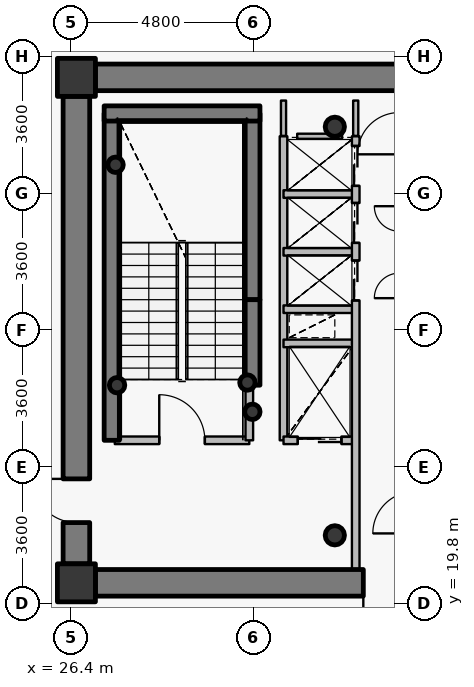
"""IFC4 building model, lengths in metres.
Left out: names, types, materials, properties, quantities, classifications, styles, units other than length and angle.
Written with IfcOpenShell. Run it as: python <this file> out.ifc"""

import sys

from ifc_helpers import new_model, si_unit, direction, frame, frame_2d, origin, origin_2d, place, context, subcontext, project, spatial, rectangle, hollow_circle, extrude, source, transform, mapped, element, fill, save


model = new_model("IFC4")
c1 = context("Model", 3, precision=1e-05, world=origin(), true_north=direction((0.0, 1.0)))
c2 = subcontext(c1, "Body", "Model", "MODEL_VIEW")
j1 = project(units=[si_unit("LENGTHUNIT", "METRE"), si_unit("PLANEANGLEUNIT", "RADIAN")], contexts=[c1])
p1 = place(None, origin())
s1 = spatial("IfcSite", under=j1, at=p1, CompositionType="ELEMENT")
p2 = place(p1, origin())
s2 = spatial("IfcBuilding", under=s1, at=p2, CompositionType="ELEMENT")
p3 = place(p2, frame((0.0, 0.0, 229.05)))
s3 = spatial("IfcBuildingStorey", under=s2, at=p3, CompositionType="ELEMENT", Elevation=229.05)
for number, where, z_axis, x_axis in (
    (1, (26.55, 20.35, 0.0), (0.0, 0.0, 1.0), (1.0, 0.0, 0.0)),
    (2, (26.55, 33.65, 0.0), (0.0, 0.0, 1.0), (1.0, 0.0, 0.0)),
):
    element("IfcColumn", number, at=place(p3, frame(where, z_axis=z_axis, x_axis=x_axis)), inside=s3, PredefinedType="COLUMN", context=c2, shape_type="SweptSolid", body=[
        extrude(rectangle(XDim=1.0, YDim=1.0, at=origin_2d()), origin(), (0.0, 0.0, 1.0), 3.75),
    ])
for number, where, z_axis, x_axis in (
    (3, (33.35, 21.6, 0.0), (0.0, 0.0, 1.0), (1.0, 0.0, 0.0)),
    (4, (33.35, 32.35, 0.0), (0.0, 0.0, 1.0), (1.0, 0.0, 0.0)),
):
    element("IfcColumn", number, at=place(p3, frame(where, z_axis=z_axis, x_axis=x_axis)), inside=s3, PredefinedType="COLUMN", context=c2, shape_type="SweptSolid", body=[
        extrude(hollow_circle(Radius=0.254, WallThickness=0.02, at=origin_2d()), origin(), (0.0, 0.0, 1.0), 3.75),
    ])
p4 = place(p3, frame((27.48, 24.1, 0.0), z_axis=(0.0, 0.0, 1.0), x_axis=(0.0, 1.0, 0.0)))
e5 = element("IfcWall", 5, at=p4, inside=s3, PredefinedType="SHEAR", context=c2, shape_type="SweptSolid", body=[
    extrude(rectangle(XDim=8.6, YDim=0.4, at=frame_2d((4.3, 0.0))), origin(), (0.0, 0.0, 1.0), 3.75),
])
p5 = place(p3, frame((31.18, 27.8, 0.0), z_axis=(0.0, 0.0, 1.0), x_axis=(0.0, 1.0, 0.0)))
e6 = element("IfcWall", 6, at=p5, inside=s3, PredefinedType="SHEAR", context=c2, shape_type="SweptSolid", body=[
    extrude(rectangle(XDim=4.9, YDim=0.4, at=frame_2d((2.45, 0.0))), origin(), (0.0, 0.0, 1.0), 3.75),
])
p6 = place(p3, frame((27.28, 32.7, 0.0), z_axis=(0.0, 0.0, 1.0), x_axis=(1.0, 0.0, 0.0)))
e7 = element("IfcWall", 7, at=p6, inside=s3, PredefinedType="SHEAR", context=c2, shape_type="SweptSolid", body=[
    extrude(rectangle(XDim=4.1, YDim=0.4, at=frame_2d((2.05, 0.0))), origin(), (0.0, 0.0, 1.0), 3.75),
])
for number, where, z_axis, x_axis in (
    (8, (27.58, 31.35, 0.0), (0.0, 0.0, 1.0), (1.0, 0.0, 0.0)),
    (9, (31.05, 25.62, 0.0), (0.0, 0.0, 1.0), (1.0, 0.0, 0.0)),
    (10, (31.18, 24.85, 0.0), (0.0, 0.0, 1.0), (1.0, 0.0, 0.0)),
    (11, (27.62, 25.55, 0.0), (0.0, 0.0, 1.0), (1.0, 0.0, 0.0)),
):
    element("IfcColumn", number, at=place(p3, frame(where, z_axis=z_axis, x_axis=x_axis)), inside=s3, PredefinedType="COLUMN", context=c2, shape_type="SweptSolid", body=[
        extrude(hollow_circle(Radius=0.203, WallThickness=0.016, at=origin_2d()), origin(), (0.0, 0.0, 1.0), 3.75),
    ])
p7 = place(p3, frame((27.05, 33.65, 0.0), z_axis=(0.0, 0.0, 1.0), x_axis=(1.0, 0.0, 0.0)))
e12 = element("IfcWall", 12, at=p7, inside=s3, PredefinedType="SHEAR", context=c2, shape_type="SweptSolid", body=[
    extrude(rectangle(XDim=17.9, YDim=0.7, at=frame_2d((8.95, 0.0))), origin(), (0.0, 0.0, 1.0), 3.05),
])
p8 = place(p7, frame((13.675, 0.0, 0.0)))
e13 = element("IfcOpeningElement", 13, at=p8, cuts=e12, PredefinedType="OPENING", context=c2, shape_type="SweptSolid", body=[
    extrude(rectangle(XDim=1.15, YDim=2.15, at=origin_2d()), frame((0.575, 0.36, 1.075), z_axis=(0.0, -1.0, 0.0), x_axis=(1.0, 0.0, 0.0)), (0.0, 0.0, 1.0), 0.72),
])
p9 = place(p3, frame((44.95, 20.35, 0.0), z_axis=(0.0, 0.0, 1.0), x_axis=(-1.0, 0.0, 0.0)))
e14 = element("IfcWall", 14, at=p9, inside=s3, PredefinedType="SHEAR", context=c2, shape_type="SweptSolid", body=[
    extrude(rectangle(XDim=17.9, YDim=0.7, at=frame_2d((8.95, 0.0))), origin(), (0.0, 0.0, 1.0), 3.05),
])
p10 = place(p9, frame((9.7, 0.0, 0.0)))
e15 = element("IfcOpeningElement", 15, at=p10, cuts=e14, PredefinedType="OPENING", context=c2, shape_type="SweptSolid", body=[
    extrude(rectangle(XDim=1.15, YDim=2.15, at=origin_2d()), frame((0.575, 0.36, 1.075), z_axis=(0.0, -1.0, 0.0), x_axis=(1.0, 0.0, 0.0)), (0.0, 0.0, 1.0), 0.72),
])
p11 = place(p3, frame((26.55, 20.85, 0.0), z_axis=(0.0, 0.0, 1.0), x_axis=(0.0, 1.0, 0.0)))
e16 = element("IfcWall", 16, at=p11, inside=s3, PredefinedType="SHEAR", context=c2, shape_type="SweptSolid", body=[
    extrude(rectangle(XDim=12.3, YDim=0.7, at=frame_2d((6.15, 0.0))), origin(), (0.0, 0.0, 1.0), 3.05),
])
p12 = place(p11, frame((1.085, 0.0, 0.0)))
e17 = element("IfcOpeningElement", 17, at=p12, cuts=e16, PredefinedType="OPENING", context=c2, shape_type="SweptSolid", body=[
    extrude(rectangle(XDim=1.15, YDim=2.15, at=origin_2d()), frame((0.575, 0.36, 1.075), z_axis=(0.0, -1.0, 0.0), x_axis=(1.0, 0.0, 0.0)), (0.0, 0.0, 1.0), 0.72),
])
p13 = place(p3, frame((31.18, 25.55, 0.0), z_axis=(0.0, 0.0, 1.0), x_axis=(0.0, 1.0, 0.0)))
e18 = element("IfcWall", 18, at=p13, inside=s3, PredefinedType="SHEAR", context=c2, shape_type="SweptSolid", body=[
    extrude(rectangle(XDim=2.25, YDim=0.4, at=frame_2d((1.125, 0.0))), origin(), (0.0, 0.0, 1.0), 3.1),
])
p14 = place(p3, frame((27.56, 24.1, 0.0), z_axis=(0.0, 0.0, 1.0), x_axis=(1.0, 0.0, 0.0)))
e19 = element("IfcWall", 19, at=p14, inside=s3, PredefinedType="PARTITIONING", context=c2, shape_type="SweptSolid", body=[
    extrude(rectangle(XDim=3.54, YDim=0.2, at=frame_2d((1.77, 0.0))), origin(), (0.0, 0.0, 1.0), 3.5),
])
p15 = place(p14, frame((1.17, 0.0, 0.0)))
e20 = element("IfcOpeningElement", 20, at=p15, cuts=e19, PredefinedType="OPENING", context=c2, shape_type="SweptSolid", body=[
    extrude(rectangle(XDim=1.2, YDim=2.15, at=origin_2d()), frame((0.6, 0.11, 1.075), z_axis=(0.0, -1.0, 0.0), x_axis=(1.0, 0.0, 0.0)), (0.0, 0.0, 1.0), 0.22),
])
p16 = place(p3, frame((31.1, 24.1, 0.0), z_axis=(0.0, 0.0, 1.0), x_axis=(0.0, 1.0, 0.0)))
e21 = element("IfcWall", 21, at=p16, inside=s3, PredefinedType="PARTITIONING", context=c2, shape_type="SweptSolid", body=[
    extrude(rectangle(XDim=1.44, YDim=0.2, at=frame_2d((0.72, 0.0))), origin(), (0.0, 0.0, 1.0), 3.5),
])
p17 = place(p3, frame((32.0, 24.1, 0.0), z_axis=(0.0, 0.0, 1.0), x_axis=(0.0, 1.0, 0.0)))
e22 = element("IfcWall", 22, at=p17, inside=s3, PredefinedType="PARTITIONING", context=c2, shape_type="SweptSolid", body=[
    extrude(rectangle(XDim=8.0, YDim=0.2, at=frame_2d((4.0, 0.0))), origin(), (0.0, 0.0, 1.0), 3.5),
])
p18 = place(p3, frame((32.0, 24.1, 0.0), z_axis=(0.0, 0.0, 1.0), x_axis=(1.0, 0.0, 0.0)))
e23 = element("IfcWall", 23, at=p18, inside=s3, PredefinedType="PARTITIONING", context=c2, shape_type="SweptSolid", body=[
    extrude(rectangle(XDim=1.9, YDim=0.2, at=frame_2d((0.95, 0.0))), origin(), (0.0, 0.0, 1.0), 3.085),
])
p19 = place(p18, frame((0.375, 0.0, 0.0)))
e24 = element("IfcOpeningElement", 24, at=p19, cuts=e23, PredefinedType="OPENING", context=c2, shape_type="SweptSolid", body=[
    extrude(rectangle(XDim=1.15, YDim=2.15, at=origin_2d()), frame((0.575, 0.11, 1.075), z_axis=(0.0, -1.0, 0.0), x_axis=(1.0, 0.0, 0.0)), (0.0, 0.0, 1.0), 0.22),
])
for number, where, z_axis, x_axis in (
    (25, (32.0, 26.65, 0.0), (0.0, 0.0, 1.0), (1.0, 0.0, 0.0)),
    (26, (32.0, 27.55, 0.0), (0.0, 0.0, 1.0), (1.0, 0.0, 0.0)),
    (27, (32.0, 29.06, 0.0), (0.0, 0.0, 1.0), (1.0, 0.0, 0.0)),
    (28, (32.0, 30.58, 0.0), (0.0, 0.0, 1.0), (1.0, 0.0, 0.0)),
):
    element("IfcWall", number, at=place(p3, frame(where, z_axis=z_axis, x_axis=x_axis)), inside=s3, PredefinedType="PARTITIONING", context=c2, shape_type="SweptSolid", body=[
        extrude(rectangle(XDim=1.9, YDim=0.2, at=frame_2d((0.95, 0.0))), origin(), (0.0, 0.0, 1.0), 3.085),
    ])
p20 = place(p3, frame((33.9, 20.7, 0.0), z_axis=(0.0, 0.0, 1.0), x_axis=(0.0, 1.0, 0.0)))
e29 = element("IfcWall", 29, at=p20, inside=s3, PredefinedType="PARTITIONING", context=c2, shape_type="SweptSolid", body=[
    extrude(rectangle(XDim=11.4, YDim=0.2, at=frame_2d((5.7, 0.0))), origin(), (0.0, 0.0, 1.0), 3.085),
])
p21 = place(p20, frame((7.08, 0.0, 0.0)))
e30 = element("IfcOpeningElement", 30, at=p21, cuts=e29, PredefinedType="OPENING", context=c2, shape_type="SweptSolid", body=[
    extrude(rectangle(XDim=1.05, YDim=2.15, at=origin_2d()), frame((0.525, 0.11, 1.075), z_axis=(0.0, -1.0, 0.0), x_axis=(1.0, 0.0, 0.0)), (0.0, 0.0, 1.0), 0.22),
])
p22 = place(p20, frame((8.595, 0.0, 0.0)))
e31 = element("IfcOpeningElement", 31, at=p22, cuts=e29, PredefinedType="OPENING", context=c2, shape_type="SweptSolid", body=[
    extrude(rectangle(XDim=1.05, YDim=2.15, at=origin_2d()), frame((0.525, 0.11, 1.075), z_axis=(0.0, -1.0, 0.0), x_axis=(1.0, 0.0, 0.0)), (0.0, 0.0, 1.0), 0.22),
])
p23 = place(p20, frame((10.095, 0.0, 0.0)))
e32 = element("IfcOpeningElement", 32, at=p23, cuts=e29, PredefinedType="OPENING", context=c2, shape_type="SweptSolid", body=[
    extrude(rectangle(XDim=1.05, YDim=2.15, at=origin_2d()), frame((0.525, 0.11, 1.075), z_axis=(0.0, -1.0, 0.0), x_axis=(1.0, 0.0, 0.0)), (0.0, 0.0, 1.0), 0.22),
])
p24 = place(p3, frame((32.36, 32.1, 0.0), z_axis=(0.0, 0.0, 1.0), x_axis=(1.0, 0.0, 0.0)))
e33 = element("IfcWall", 33, at=p24, inside=s3, PredefinedType="PARTITIONING", context=c2, shape_type="SweptSolid", body=[
    extrude(rectangle(XDim=1.18, YDim=0.135, at=frame_2d((0.59, 0.0))), origin(), (0.0, 0.0, 1.0), 3.085),
])
p25 = place(p3, frame((32.0, 33.04, 0.0), z_axis=(0.0, 0.0, 1.0), x_axis=(0.0, -1.0, 0.0)))
e34 = element("IfcWall", 34, at=p25, inside=s3, PredefinedType="PARTITIONING", context=c2, shape_type="SweptSolid", body=[
    extrude(rectangle(XDim=0.93, YDim=0.135, at=frame_2d((0.465, 0.0))), origin(), (0.0, 0.0, 1.0), 3.035),
])
p26 = place(p3, frame((33.9, 32.11, 0.0), z_axis=(0.0, 0.0, 1.0), x_axis=(0.0, 1.0, 0.0)))
e35 = element("IfcWall", 35, at=p26, inside=s3, PredefinedType="PARTITIONING", context=c2, shape_type="SweptSolid", body=[
    extrude(rectangle(XDim=0.93, YDim=0.135, at=frame_2d((0.465, 0.0))), origin(), (0.0, 0.0, 1.0), 3.085),
])
p27 = place(p3, frame((27.04, 34.0, 0.0), z_axis=(0.0, 0.0, 1.0), x_axis=(-1.0, 0.0, 0.0)))
e36 = element("IfcWall", 36, at=p27, inside=s3, PredefinedType="PARTITIONING", context=c2, shape_type="SweptSolid", body=[
    extrude(rectangle(XDim=0.84, YDim=0.135, at=frame_2d((0.42, 0.0))), origin(), (0.0, 0.0, 1.0), 2.935),
])
p28 = place(p3, frame((26.2, 33.692, 0.0), z_axis=(0.0, 0.0, 1.0), x_axis=(0.0, -1.0, 0.0)))
e37 = element("IfcWall", 37, at=p28, inside=s3, PredefinedType="PARTITIONING", context=c2, shape_type="SweptSolid", body=[
    extrude(rectangle(XDim=0.532, YDim=0.135, at=frame_2d((0.266, 0.0))), origin(), (0.0, 0.0, 1.0), 3.5),
])
p29 = place(p3, frame((26.2, 20.84, 0.0), z_axis=(0.0, 0.0, 1.0), x_axis=(0.0, -1.0, 0.0)))
e38 = element("IfcWall", 38, at=p29, inside=s3, PredefinedType="PARTITIONING", context=c2, shape_type="SweptSolid", body=[
    extrude(rectangle(XDim=0.84, YDim=0.135, at=frame_2d((0.42, 0.0))), origin(), (0.0, 0.0, 1.0), 3.185),
])
p30 = place(p3, frame((26.508, 20.0, 0.0), z_axis=(0.0, 0.0, 1.0), x_axis=(1.0, 0.0, 0.0)))
e39 = element("IfcWall", 39, at=p30, inside=s3, PredefinedType="PARTITIONING", context=c2, shape_type="SweptSolid", body=[
    extrude(rectangle(XDim=0.532, YDim=0.135, at=frame_2d((0.266, 0.0))), origin(), (0.0, 0.0, 1.0), 2.935),
])
m1 = source(origin(), c2, "Body", "SweptSolid", [
    extrude(rectangle(XDim=1.15, YDim=2.15, at=origin_2d()), frame((0.575, 0.025, 1.075), z_axis=(0.0, -1.0, 0.0), x_axis=(1.0, 0.0, 0.0)), (0.0, 0.0, 1.0), 0.05),
])
p31 = place(p12, origin())
e40 = element("IfcDoor", 40, at=p31, inside=s3, OperationType="SINGLE_SWING_RIGHT", PredefinedType="DOOR", context=c2, shape_type="MappedRepresentation", body=[
    mapped(m1, transform((0.0, 0.0, 0.0), x_axis=(1.0, 0.0, 0.0), y_axis=(0.0, 1.0, 0.0), z_axis=(0.0, 0.0, 1.0), scale=1.0)),
])
fill(e17, e40)
p32 = place(p10, origin())
e41 = element("IfcDoor", 41, at=p32, inside=s3, OperationType="SINGLE_SWING_RIGHT", PredefinedType="DOOR", context=c2, shape_type="MappedRepresentation", body=[
    mapped(m1, transform((0.0, 0.0, 0.0), x_axis=(1.0, 0.0, 0.0), y_axis=(0.0, 1.0, 0.0), z_axis=(0.0, 0.0, 1.0), scale=1.0)),
])
fill(e15, e41)
m2 = source(origin(), c2, "Body", "SweptSolid", [
    extrude(rectangle(XDim=1.2, YDim=2.15, at=origin_2d()), frame((0.6, 0.025, 1.075), z_axis=(0.0, -1.0, 0.0), x_axis=(1.0, 0.0, 0.0)), (0.0, 0.0, 1.0), 0.05),
])
p33 = place(p15, origin())
e42 = element("IfcDoor", 42, at=p33, inside=s3, OperationType="SINGLE_SWING_LEFT", PredefinedType="DOOR", context=c2, shape_type="MappedRepresentation", body=[
    mapped(m2, transform((0.0, 0.0, 0.0), x_axis=(1.0, 0.0, 0.0), y_axis=(0.0, 1.0, 0.0), z_axis=(0.0, 0.0, 1.0), scale=1.0)),
])
fill(e20, e42)
m3 = source(origin(), c2, "Body", "SweptSolid", [
    extrude(rectangle(XDim=1.15, YDim=2.15, at=origin_2d()), frame((0.575, 0.025, 1.075), z_axis=(0.0, -1.0, 0.0), x_axis=(1.0, 0.0, 0.0)), (0.0, 0.0, 1.0), 0.05),
])
p34 = place(p19, origin())
e43 = element("IfcDoor", 43, at=p34, inside=s3, OperationType="DOUBLE_DOOR_SLIDING", PredefinedType="USERDEFINED", context=c2, shape_type="MappedRepresentation", body=[
    mapped(m3, transform((0.0, 0.0, 0.0), x_axis=(1.0, 0.0, 0.0), y_axis=(0.0, 1.0, 0.0), z_axis=(0.0, 0.0, 1.0), scale=1.0)),
])
fill(e24, e43)
m4 = source(origin(), c2, "Body", "SweptSolid", [
    extrude(rectangle(XDim=1.05, YDim=2.15, at=origin_2d()), frame((0.525, 0.025, 1.075), z_axis=(0.0, -1.0, 0.0), x_axis=(1.0, 0.0, 0.0)), (0.0, 0.0, 1.0), 0.05),
])
p35 = place(p21, origin())
e44 = element("IfcDoor", 44, at=p35, inside=s3, OperationType="DOUBLE_DOOR_SLIDING", PredefinedType="USERDEFINED", context=c2, shape_type="MappedRepresentation", body=[
    mapped(m4, transform((0.0, 0.0, 0.0), x_axis=(1.0, 0.0, 0.0), y_axis=(0.0, 1.0, 0.0), z_axis=(0.0, 0.0, 1.0), scale=1.0)),
])
fill(e30, e44)
p36 = place(p22, origin())
e45 = element("IfcDoor", 45, at=p36, inside=s3, OperationType="DOUBLE_DOOR_SLIDING", PredefinedType="USERDEFINED", context=c2, shape_type="MappedRepresentation", body=[
    mapped(m4, transform((0.0, 0.0, 0.0), x_axis=(1.0, 0.0, 0.0), y_axis=(0.0, 1.0, 0.0), z_axis=(0.0, 0.0, 1.0), scale=1.0)),
])
fill(e31, e45)
p37 = place(p23, origin())
e46 = element("IfcDoor", 46, at=p37, inside=s3, OperationType="DOUBLE_DOOR_SLIDING", PredefinedType="USERDEFINED", context=c2, shape_type="MappedRepresentation", body=[
    mapped(m4, transform((0.0, 0.0, 0.0), x_axis=(1.0, 0.0, 0.0), y_axis=(0.0, 1.0, 0.0), z_axis=(0.0, 0.0, 1.0), scale=1.0)),
])
fill(e32, e46)
save(model, sys.argv[1])
